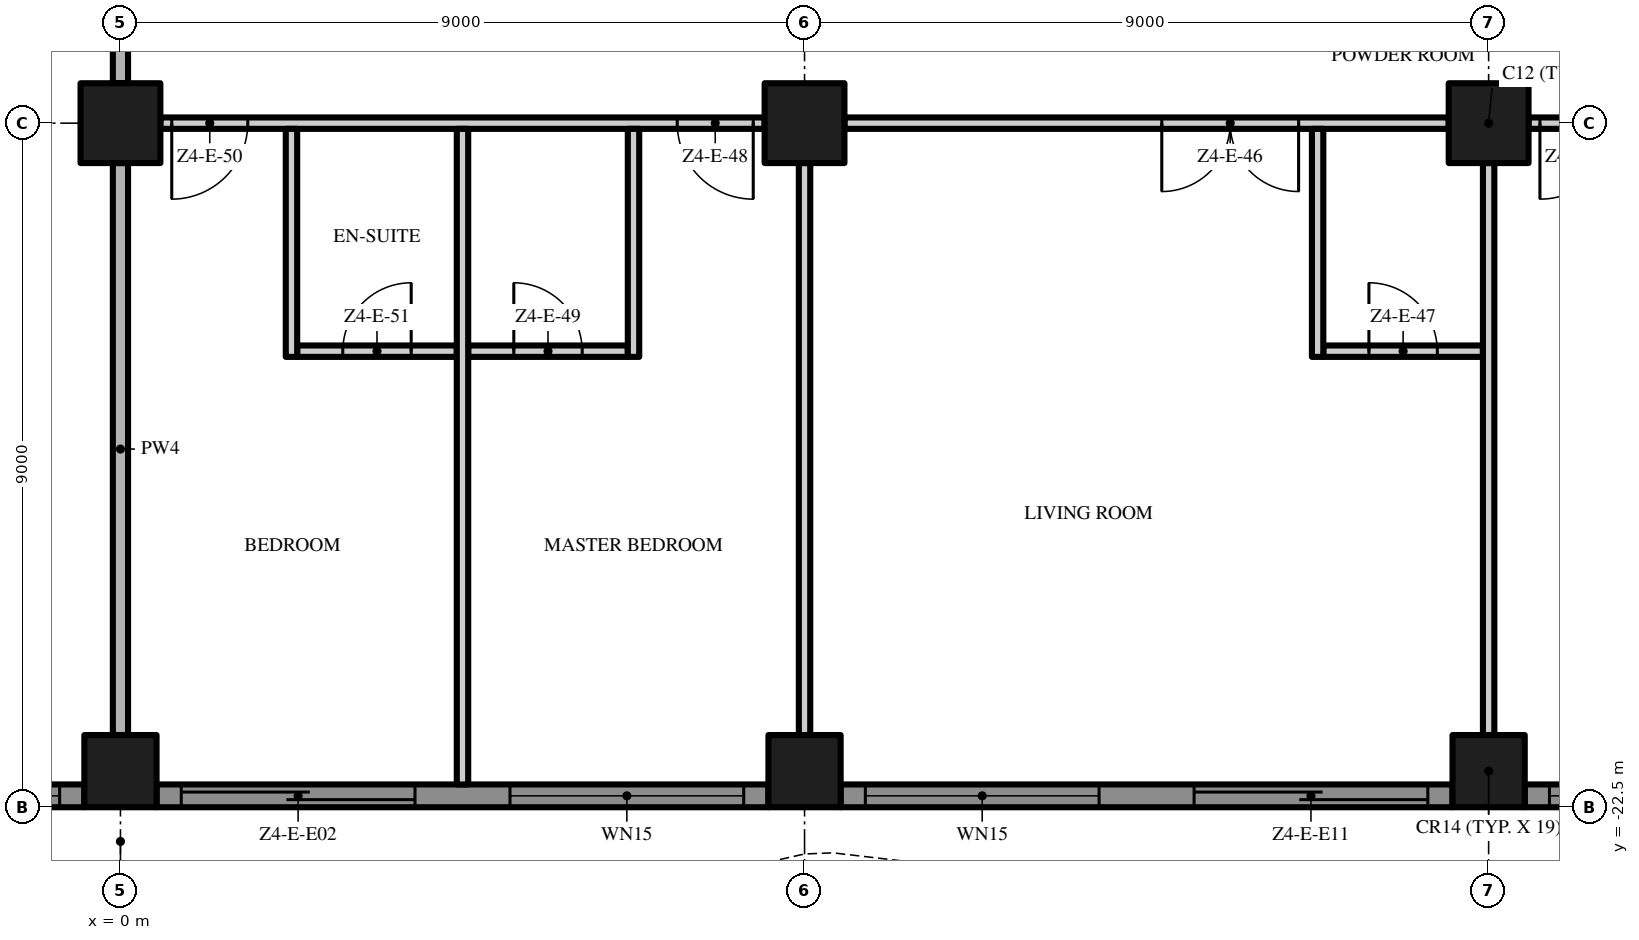
"""IFC4 building model, lengths in metres.
Left out: names, types, materials, properties, quantities, classifications, styles, units other than length and angle.
Written with IfcOpenShell. Run it as: python <this file> out.ifc"""

import sys

from ifc_helpers import new_model, si_unit, direction, frame, frame_2d, origin, origin_2d, place, context, subcontext, project, spatial, polyline, rectangle, outline, extrude, element, fill, save


model = new_model("IFC4")
c1 = context("Model", 3, precision=1e-05, world=origin(), true_north=direction((0.0, 1.0)))
c2 = subcontext(c1, "Body", "Model", "MODEL_VIEW")
j1 = project(units=[si_unit("LENGTHUNIT", "METRE"), si_unit("PLANEANGLEUNIT", "RADIAN")], contexts=[c1])
p1 = place(None, origin())
s1 = spatial("IfcSite", under=j1, at=p1, CompositionType="ELEMENT")
p2 = place(p1, origin())
s2 = spatial("IfcBuilding", under=s1, at=p2, CompositionType="ELEMENT")
p3 = place(p2, frame((0.0, 0.0, 230.0)))
s3 = spatial("IfcBuildingStorey", under=s2, at=p3, CompositionType="ELEMENT", Elevation=230.0)
p4 = place(p3, frame((0.0, -13.5, 0.0), z_axis=(0.0, 0.0, 1.0), x_axis=(1.0, 0.0, 0.0)))
e1 = element("IfcColumn", 1, at=p4, inside=s3, PredefinedType="COLUMN", context=c2, shape_type="SweptSolid", body=[
    extrude(rectangle(XDim=1.05, YDim=1.05, at=origin_2d()), origin(), (0.0, 0.0, 1.0), 3.5),
])
p5 = place(p3, frame((0.0, -22.025, 0.0), z_axis=(0.0, 0.0, 1.0), x_axis=(1.0, 0.0, 0.0)))
e2 = element("IfcColumn", 2, at=p5, inside=s3, PredefinedType="COLUMN", context=c2, shape_type="SweptSolid", body=[
    extrude(rectangle(XDim=0.95, YDim=0.95, at=origin_2d()), origin(), (0.0, 0.0, 1.0), 3.5),
])
p6 = place(p3, frame((18.0, -13.5, 0.0), z_axis=(0.0, 0.0, 1.0), x_axis=(1.0, 0.0, 0.0)))
e3 = element("IfcColumn", 3, at=p6, inside=s3, PredefinedType="COLUMN", context=c2, shape_type="SweptSolid", body=[
    extrude(rectangle(XDim=1.05, YDim=1.05, at=origin_2d()), origin(), (0.0, 0.0, 1.0), 3.5),
])
p7 = place(p3, frame((18.0, -22.025, 0.0), z_axis=(0.0, 0.0, 1.0), x_axis=(1.0, 0.0, 0.0)))
e4 = element("IfcColumn", 4, at=p7, inside=s3, PredefinedType="COLUMN", context=c2, shape_type="SweptSolid", body=[
    extrude(rectangle(XDim=0.95, YDim=0.95, at=origin_2d()), origin(), (0.0, 0.0, 1.0), 3.5),
])
p8 = place(p3, frame((9.0, -13.5, 0.0), z_axis=(0.0, 0.0, 1.0), x_axis=(1.0, 0.0, 0.0)))
e5 = element("IfcColumn", 5, at=p8, inside=s3, PredefinedType="COLUMN", context=c2, shape_type="SweptSolid", body=[
    extrude(rectangle(XDim=1.05, YDim=1.05, at=origin_2d()), origin(), (0.0, 0.0, 1.0), 3.5),
])
p9 = place(p3, frame((9.0, -22.025, 0.0), z_axis=(0.0, 0.0, 1.0), x_axis=(1.0, 0.0, 0.0)))
e6 = element("IfcColumn", 6, at=p9, inside=s3, PredefinedType="COLUMN", context=c2, shape_type="SweptSolid", body=[
    extrude(rectangle(XDim=0.95, YDim=0.95, at=origin_2d()), origin(), (0.0, 0.0, 1.0), 3.5),
])
p10 = place(p3, frame((-0.475, -22.35, 0.0), z_axis=(0.0, 0.0, 1.0), x_axis=(-1.0, 0.0, 0.0)))
e7 = element("IfcWall", 7, at=p10, inside=s3, PredefinedType="SOLIDWALL", context=c2, shape_type="SweptSolid", body=[
    extrude(rectangle(XDim=8.05, YDim=0.3, at=frame_2d((4.025, 0.0))), origin(), (0.0, 0.0, 1.0), 3.5),
])
p11 = place(p10, frame((4.65, 0.0, 0.45)))
e8 = element("IfcOpeningElement", 8, at=p11, cuts=e7, PredefinedType="OPENING", context=c2, shape_type="SweptSolid", body=[
    extrude(rectangle(XDim=3.075, YDim=2.65, at=frame_2d((1.538, 1.325))), frame((0.0, 0.16, 0.0), z_axis=(0.0, -1.0, 0.0), x_axis=(1.0, 0.0, 0.0)), (0.0, 0.0, 1.0), 0.32),
])
p12 = place(p10, frame((0.325, 0.0, 0.45)))
e9 = element("IfcOpeningElement", 9, at=p12, cuts=e7, PredefinedType="OPENING", context=c2, shape_type="SweptSolid", body=[
    extrude(rectangle(XDim=3.075, YDim=2.65, at=frame_2d((1.538, 1.325))), frame((0.0, 0.16, 0.0), z_axis=(0.0, -1.0, 0.0), x_axis=(1.0, 0.0, 0.0)), (0.0, 0.0, 1.0), 0.32),
])
p13 = place(p3, frame((8.525, -22.35, 0.0), z_axis=(0.0, 0.0, 1.0), x_axis=(-1.0, 0.0, 0.0)))
e10 = element("IfcWall", 10, at=p13, inside=s3, PredefinedType="SOLIDWALL", context=c2, shape_type="SweptSolid", body=[
    extrude(rectangle(XDim=8.05, YDim=0.3, at=frame_2d((4.025, 0.0))), origin(), (0.0, 0.0, 1.0), 3.5),
])
p14 = place(p13, frame((4.65, 0.0, 0.0)))
e11 = element("IfcOpeningElement", 11, at=p14, cuts=e10, PredefinedType="OPENING", context=c2, shape_type="SweptSolid", body=[
    extrude(rectangle(XDim=3.075, YDim=2.4, at=frame_2d((1.538, 1.2))), frame((0.0, 0.16, 0.0), z_axis=(0.0, -1.0, 0.0), x_axis=(1.0, 0.0, 0.0)), (0.0, 0.0, 1.0), 0.32),
])
p15 = place(p13, frame((0.325, 0.0, 0.45)))
e12 = element("IfcOpeningElement", 12, at=p15, cuts=e10, PredefinedType="OPENING", context=c2, shape_type="SweptSolid", body=[
    extrude(rectangle(XDim=3.075, YDim=2.65, at=frame_2d((1.538, 1.325))), frame((0.0, 0.16, 0.0), z_axis=(0.0, -1.0, 0.0), x_axis=(1.0, 0.0, 0.0)), (0.0, 0.0, 1.0), 0.32),
])
p16 = place(p3, frame((17.525, -22.35, 0.0), z_axis=(0.0, 0.0, 1.0), x_axis=(-1.0, 0.0, 0.0)))
e13 = element("IfcWall", 13, at=p16, inside=s3, PredefinedType="SOLIDWALL", context=c2, shape_type="SweptSolid", body=[
    extrude(rectangle(XDim=8.05, YDim=0.3, at=frame_2d((4.025, 0.0))), origin(), (0.0, 0.0, 1.0), 3.5),
])
p17 = place(p16, frame((4.65, 0.0, 0.45)))
e14 = element("IfcOpeningElement", 14, at=p17, cuts=e13, PredefinedType="OPENING", context=c2, shape_type="SweptSolid", body=[
    extrude(rectangle(XDim=3.075, YDim=2.65, at=frame_2d((1.538, 1.325))), frame((0.0, 0.16, 0.0), z_axis=(0.0, -1.0, 0.0), x_axis=(1.0, 0.0, 0.0)), (0.0, 0.0, 1.0), 0.32),
])
p18 = place(p16, frame((0.325, 0.0, 0.0)))
e15 = element("IfcOpeningElement", 15, at=p18, cuts=e13, PredefinedType="OPENING", context=c2, shape_type="SweptSolid", body=[
    extrude(rectangle(XDim=3.075, YDim=2.4, at=frame_2d((1.538, 1.2))), frame((0.0, 0.16, 0.0), z_axis=(0.0, -1.0, 0.0), x_axis=(1.0, 0.0, 0.0)), (0.0, 0.0, 1.0), 0.32),
])
p19 = place(p3, frame((22.5, -22.35, 0.0), z_axis=(0.0, 0.0, 1.0), x_axis=(-1.0, 0.0, 0.0)))
e16 = element("IfcWall", 16, at=p19, inside=s3, PredefinedType="SOLIDWALL", context=c2, shape_type="SweptSolid", body=[
    extrude(rectangle(XDim=4.025, YDim=0.3, at=frame_2d((2.013, 0.0))), origin(), (0.0, 0.0, 1.0), 3.5),
])
p20 = place(p19, frame((0.625, 0.0, 0.45)))
e17 = element("IfcOpeningElement", 17, at=p20, cuts=e16, PredefinedType="OPENING", context=c2, shape_type="SweptSolid", body=[
    extrude(rectangle(XDim=3.075, YDim=2.65, at=frame_2d((1.538, 1.325))), frame((0.0, 0.16, 0.0), z_axis=(0.0, -1.0, 0.0), x_axis=(1.0, 0.0, 0.0)), (0.0, 0.0, 1.0), 0.32),
])
p21 = place(p3, origin())
e18 = element("IfcWall", 18, at=p21, inside=s3, PredefinedType="USERDEFINED", context=c2, shape_type="SweptSolid", body=[
    extrude(outline(polyline([(-22.5, -23.451), (-21.0, -23.115), (-20.625, -23.1), (-19.5, -23.231), (-18.0, -23.755), (-16.5, -24.488), (-15.0, -25.149), (-13.5, -25.485), (-13.125, -25.5), (-12.0, -25.369), (-10.5, -24.845), (-9.0, -24.112), (-7.5, -23.451), (-6.0, -23.115), (-5.625, -23.1), (-4.5, -23.231), (-3.0, -23.755), (-1.5, -24.488), (0.0, -25.149), (1.5, -25.485), (1.875, -25.5), (3.0, -25.369), (4.5, -24.845), (6.0, -24.112), (7.5, -23.451), (9.0, -23.115), (9.375, -23.1), (10.5, -23.231), (12.0, -23.755), (13.5, -24.488), (15.0, -25.149), (16.5, -25.485), (16.875, -25.5), (18.0, -25.369), (19.5, -24.845), (21.0, -24.112), (22.5, -23.451), (22.399, -23.223), (20.895, -23.885), (19.404, -24.614), (17.944, -25.124), (16.865, -25.249), (16.533, -25.236), (15.079, -24.91), (13.605, -24.261), (12.096, -23.524), (10.556, -22.986), (9.385, -22.849), (8.967, -22.866), (7.421, -23.213), (5.895, -23.885), (4.404, -24.614), (2.944, -25.124), (1.865, -25.249), (1.533, -25.236), (0.079, -24.91), (-1.395, -24.261), (-2.904, -23.524), (-4.444, -22.986), (-5.615, -22.849), (-6.033, -22.866), (-7.579, -23.213), (-9.105, -23.885), (-10.596, -24.614), (-12.056, -25.124), (-13.135, -25.249), (-13.467, -25.236), (-14.921, -24.91), (-16.395, -24.261), (-17.904, -23.524), (-19.444, -22.986), (-20.615, -22.849), (-21.033, -22.866), (-22.555, -23.208), (-22.5, -23.451)])), origin(), (0.0, 0.0, 1.0), 0.9),
])
p22 = place(p3, frame((2.325, -16.5, 0.0), z_axis=(0.0, 0.0, 1.0), x_axis=(1.0, 0.0, 0.0)))
e19 = element("IfcWall", 19, at=p22, inside=s3, PredefinedType="PARTITIONING", context=c2, shape_type="SweptSolid", body=[
    extrude(rectangle(XDim=2.1, YDim=0.15, at=frame_2d((1.05, 0.0))), origin(), (0.0, 0.0, 1.0), 3.5),
])
p23 = place(p22, frame((0.6, 0.0, 0.0)))
e20 = element("IfcOpeningElement", 20, at=p23, cuts=e19, PredefinedType="OPENING", context=c2, shape_type="SweptSolid", body=[
    extrude(rectangle(XDim=0.9, YDim=2.1, at=frame_2d((0.45, 1.05))), frame((0.0, 0.085, 0.0), z_axis=(0.0, -1.0, 0.0), x_axis=(1.0, 0.0, 0.0)), (0.0, 0.0, 1.0), 0.17),
])
p24 = place(p3, frame((4.575, -16.5, 0.0), z_axis=(0.0, 0.0, 1.0), x_axis=(1.0, 0.0, 0.0)))
e21 = element("IfcWall", 21, at=p24, inside=s3, PredefinedType="PARTITIONING", context=c2, shape_type="SweptSolid", body=[
    extrude(rectangle(XDim=2.1, YDim=0.15, at=frame_2d((1.05, 0.0))), origin(), (0.0, 0.0, 1.0), 3.5),
])
p25 = place(p24, frame((0.6, 0.0, 0.0)))
e22 = element("IfcOpeningElement", 22, at=p25, cuts=e21, PredefinedType="OPENING", context=c2, shape_type="SweptSolid", body=[
    extrude(rectangle(XDim=0.9, YDim=2.1, at=frame_2d((0.45, 1.05))), frame((0.0, 0.085, 0.0), z_axis=(0.0, -1.0, 0.0), x_axis=(1.0, 0.0, 0.0)), (0.0, 0.0, 1.0), 0.17),
])
p26 = place(p3, frame((15.825, -16.5, 0.0), z_axis=(0.0, 0.0, 1.0), x_axis=(1.0, 0.0, 0.0)))
e23 = element("IfcWall", 23, at=p26, inside=s3, PredefinedType="PARTITIONING", context=c2, shape_type="SweptSolid", body=[
    extrude(rectangle(XDim=2.1, YDim=0.15, at=frame_2d((1.05, 0.0))), origin(), (0.0, 0.0, 1.0), 3.5),
])
p27 = place(p26, frame((0.6, 0.0, 0.0)))
e24 = element("IfcOpeningElement", 24, at=p27, cuts=e23, PredefinedType="OPENING", context=c2, shape_type="SweptSolid", body=[
    extrude(rectangle(XDim=0.9, YDim=2.1, at=frame_2d((0.45, 1.05))), frame((0.0, 0.085, 0.0), z_axis=(0.0, -1.0, 0.0), x_axis=(1.0, 0.0, 0.0)), (0.0, 0.0, 1.0), 0.17),
])
p28 = place(p3, frame((8.475, -13.5, 0.0), z_axis=(0.0, 0.0, 1.0), x_axis=(-1.0, 0.0, 0.0)))
e25 = element("IfcWall", 25, at=p28, inside=s3, PredefinedType="PARTITIONING", context=c2, shape_type="SweptSolid", body=[
    extrude(rectangle(XDim=7.95, YDim=0.15, at=frame_2d((3.975, 0.0))), origin(), (0.0, 0.0, 1.0), 3.5),
])
p29 = place(p28, frame((0.15, 0.0, 0.0)))
e26 = element("IfcOpeningElement", 26, at=p29, cuts=e25, PredefinedType="OPENING", context=c2, shape_type="SweptSolid", body=[
    extrude(rectangle(XDim=1.0, YDim=2.4, at=frame_2d((0.5, 1.2))), frame((0.0, 0.085, 0.0), z_axis=(0.0, -1.0, 0.0), x_axis=(1.0, 0.0, 0.0)), (0.0, 0.0, 1.0), 0.17),
])
p30 = place(p28, frame((6.8, 0.0, 0.0)))
e27 = element("IfcOpeningElement", 27, at=p30, cuts=e25, PredefinedType="OPENING", context=c2, shape_type="SweptSolid", body=[
    extrude(rectangle(XDim=1.0, YDim=2.4, at=frame_2d((0.5, 1.2))), frame((0.0, 0.085, 0.0), z_axis=(0.0, -1.0, 0.0), x_axis=(1.0, 0.0, 0.0)), (0.0, 0.0, 1.0), 0.17),
])
p31 = place(p3, frame((17.475, -13.5, 0.0), z_axis=(0.0, 0.0, 1.0), x_axis=(-1.0, 0.0, 0.0)))
e28 = element("IfcWall", 28, at=p31, inside=s3, PredefinedType="PARTITIONING", context=c2, shape_type="SweptSolid", body=[
    extrude(rectangle(XDim=7.95, YDim=0.15, at=frame_2d((3.975, 0.0))), origin(), (0.0, 0.0, 1.0), 3.5),
])
p32 = place(p31, frame((1.975, 0.0, 0.0)))
e29 = element("IfcOpeningElement", 29, at=p32, cuts=e28, PredefinedType="OPENING", context=c2, shape_type="SweptSolid", body=[
    extrude(rectangle(XDim=1.8, YDim=2.4, at=frame_2d((0.9, 1.2))), frame((0.0, 0.085, 0.0), z_axis=(0.0, -1.0, 0.0), x_axis=(1.0, 0.0, 0.0)), (0.0, 0.0, 1.0), 0.17),
])
p33 = place(p3, frame((26.05, -13.5, 0.0), z_axis=(0.0, 0.0, 1.0), x_axis=(-1.0, 0.0, 0.0)))
e30 = element("IfcWall", 30, at=p33, inside=s3, PredefinedType="PARTITIONING", context=c2, shape_type="SweptSolid", body=[
    extrude(rectangle(XDim=7.525, YDim=0.15, at=frame_2d((3.763, 0.0))), origin(), (0.0, 0.0, 1.0), 3.5),
])
p34 = place(p33, frame((0.8, 0.0, 0.0)))
e31 = element("IfcOpeningElement", 31, at=p34, cuts=e30, PredefinedType="OPENING", context=c2, shape_type="SweptSolid", body=[
    extrude(rectangle(XDim=1.0, YDim=2.4, at=frame_2d((0.5, 1.2))), frame((0.0, 0.085, 0.0), z_axis=(0.0, -1.0, 0.0), x_axis=(1.0, 0.0, 0.0)), (0.0, 0.0, 1.0), 0.17),
])
p35 = place(p33, frame((6.375, 0.0, 0.0)))
e32 = element("IfcOpeningElement", 32, at=p35, cuts=e30, PredefinedType="OPENING", context=c2, shape_type="SweptSolid", body=[
    extrude(rectangle(XDim=1.0, YDim=2.4, at=frame_2d((0.5, 1.2))), frame((0.0, 0.085, 0.0), z_axis=(0.0, -1.0, 0.0), x_axis=(1.0, 0.0, 0.0)), (0.0, 0.0, 1.0), 0.17),
])
p36 = place(p3, frame((0.0, -21.55, 0.0), z_axis=(0.0, 0.0, 1.0), x_axis=(0.0, 1.0, 0.0)))
e33 = element("IfcWall", 33, at=p36, inside=s3, PredefinedType="PARTITIONING", context=c2, shape_type="SweptSolid", body=[
    extrude(rectangle(XDim=7.525, YDim=0.2, at=frame_2d((3.763, 0.0))), origin(), (0.0, 0.0, 1.0), 3.5),
])
p37 = place(p3, frame((0.0, -12.975, 0.0), z_axis=(0.0, 0.0, 1.0), x_axis=(0.0, 1.0, 0.0)))
e34 = element("IfcWall", 34, at=p37, inside=s3, PredefinedType="PARTITIONING", context=c2, shape_type="SweptSolid", body=[
    extrude(rectangle(XDim=7.95, YDim=0.2, at=frame_2d((3.975, 0.0))), origin(), (0.0, 0.0, 1.0), 3.5),
])
p38 = place(p3, frame((2.25, -16.575, 0.0), z_axis=(0.0, 0.0, 1.0), x_axis=(0.0, 1.0, 0.0)))
e35 = element("IfcWall", 35, at=p38, inside=s3, PredefinedType="PARTITIONING", context=c2, shape_type="SweptSolid", body=[
    extrude(rectangle(XDim=3.0, YDim=0.15, at=frame_2d((1.5, 0.0))), origin(), (0.0, 0.0, 1.0), 3.5),
])
p39 = place(p3, frame((4.5, -22.2, 0.0), z_axis=(0.0, 0.0, 1.0), x_axis=(0.0, 1.0, 0.0)))
e36 = element("IfcWall", 36, at=p39, inside=s3, PredefinedType="PARTITIONING", context=c2, shape_type="SweptSolid", body=[
    extrude(rectangle(XDim=8.625, YDim=0.15, at=frame_2d((4.312, 0.0))), origin(), (0.0, 0.0, 1.0), 3.5),
])
p40 = place(p3, frame((6.75, -16.575, 0.0), z_axis=(0.0, 0.0, 1.0), x_axis=(0.0, 1.0, 0.0)))
e37 = element("IfcWall", 37, at=p40, inside=s3, PredefinedType="PARTITIONING", context=c2, shape_type="SweptSolid", body=[
    extrude(rectangle(XDim=3.0, YDim=0.15, at=frame_2d((1.5, 0.0))), origin(), (0.0, 0.0, 1.0), 3.5),
])
p41 = place(p3, frame((9.0, -21.55, 0.0), z_axis=(0.0, 0.0, 1.0), x_axis=(0.0, 1.0, 0.0)))
e38 = element("IfcWall", 38, at=p41, inside=s3, PredefinedType="PARTITIONING", context=c2, shape_type="SweptSolid", body=[
    extrude(rectangle(XDim=7.525, YDim=0.15, at=frame_2d((3.763, 0.0))), origin(), (0.0, 0.0, 1.0), 3.5),
])
p42 = place(p3, frame((15.75, -16.575, 0.0), z_axis=(0.0, 0.0, 1.0), x_axis=(0.0, 1.0, 0.0)))
e39 = element("IfcWall", 39, at=p42, inside=s3, PredefinedType="PARTITIONING", context=c2, shape_type="SweptSolid", body=[
    extrude(rectangle(XDim=3.0, YDim=0.15, at=frame_2d((1.5, 0.0))), origin(), (0.0, 0.0, 1.0), 3.5),
])
p43 = place(p3, frame((18.0, -21.55, 0.0), z_axis=(0.0, 0.0, 1.0), x_axis=(0.0, 1.0, 0.0)))
e40 = element("IfcWall", 40, at=p43, inside=s3, PredefinedType="PARTITIONING", context=c2, shape_type="SweptSolid", body=[
    extrude(rectangle(XDim=7.525, YDim=0.15, at=frame_2d((3.763, 0.0))), origin(), (0.0, 0.0, 1.0), 3.5),
])
p44 = place(p12, origin())
e41 = element("IfcWindow", 41, at=p44, inside=s3, PartitioningType="SINGLE_PANEL", PredefinedType="WINDOW", context=c2, shape_type="SweptSolid", body=[
    extrude(rectangle(XDim=3.075, YDim=2.65, at=frame_2d((1.538, 1.325))), frame((0.0, 0.03, 0.0), z_axis=(0.0, -1.0, 0.0), x_axis=(1.0, 0.0, 0.0)), (0.0, 0.0, 1.0), 0.06),
])
fill(e9, e41)
p45 = place(p14, origin())
e42 = element("IfcDoor", 42, at=p45, inside=s3, OperationType="SINGLE_SWING_LEFT", PredefinedType="DOOR", context=c2, shape_type="SweptSolid", body=[
    extrude(rectangle(XDim=3.075, YDim=2.4, at=frame_2d((1.538, 1.2))), frame((0.0, 0.025, 0.0), z_axis=(0.0, -1.0, 0.0), x_axis=(1.0, 0.0, 0.0)), (0.0, 0.0, 1.0), 0.05),
])
fill(e11, e42)
p46 = place(p15, origin())
e43 = element("IfcWindow", 43, at=p46, inside=s3, PartitioningType="SINGLE_PANEL", PredefinedType="WINDOW", context=c2, shape_type="SweptSolid", body=[
    extrude(rectangle(XDim=3.075, YDim=2.65, at=frame_2d((1.538, 1.325))), frame((0.0, 0.03, 0.0), z_axis=(0.0, -1.0, 0.0), x_axis=(1.0, 0.0, 0.0)), (0.0, 0.0, 1.0), 0.06),
])
fill(e12, e43)
p47 = place(p17, origin())
e44 = element("IfcWindow", 44, at=p47, inside=s3, PartitioningType="SINGLE_PANEL", PredefinedType="WINDOW", context=c2, shape_type="SweptSolid", body=[
    extrude(rectangle(XDim=3.075, YDim=2.65, at=frame_2d((1.538, 1.325))), frame((0.0, 0.03, 0.0), z_axis=(0.0, -1.0, 0.0), x_axis=(1.0, 0.0, 0.0)), (0.0, 0.0, 1.0), 0.06),
])
fill(e14, e44)
p48 = place(p18, origin())
e45 = element("IfcDoor", 45, at=p48, inside=s3, OperationType="SINGLE_SWING_LEFT", PredefinedType="DOOR", context=c2, shape_type="SweptSolid", body=[
    extrude(rectangle(XDim=3.075, YDim=2.4, at=frame_2d((1.538, 1.2))), frame((0.0, 0.025, 0.0), z_axis=(0.0, -1.0, 0.0), x_axis=(1.0, 0.0, 0.0)), (0.0, 0.0, 1.0), 0.05),
])
fill(e15, e45)
p49 = place(p20, origin())
e46 = element("IfcWindow", 46, at=p49, inside=s3, PartitioningType="SINGLE_PANEL", PredefinedType="WINDOW", context=c2, shape_type="SweptSolid", body=[
    extrude(rectangle(XDim=3.075, YDim=2.65, at=frame_2d((1.538, 1.325))), frame((0.0, 0.03, 0.0), z_axis=(0.0, -1.0, 0.0), x_axis=(1.0, 0.0, 0.0)), (0.0, 0.0, 1.0), 0.06),
])
fill(e17, e46)
p50 = place(p35, origin())
e47 = element("IfcDoor", 47, at=p50, inside=s3, OperationType="SINGLE_SWING_RIGHT", PredefinedType="DOOR", context=c2, shape_type="SweptSolid", body=[
    extrude(rectangle(XDim=1.0, YDim=2.4, at=frame_2d((0.5, 1.2))), frame((0.0, 0.025, 0.0), z_axis=(0.0, -1.0, 0.0), x_axis=(1.0, 0.0, 0.0)), (0.0, 0.0, 1.0), 0.05),
])
fill(e32, e47)
p51 = place(p32, origin())
e48 = element("IfcDoor", 48, at=p51, inside=s3, OperationType="DOUBLE_DOOR_SINGLE_SWING", PredefinedType="DOOR", context=c2, shape_type="SweptSolid", body=[
    extrude(rectangle(XDim=1.8, YDim=2.4, at=frame_2d((0.9, 1.2))), frame((0.0, 0.025, 0.0), z_axis=(0.0, -1.0, 0.0), x_axis=(1.0, 0.0, 0.0)), (0.0, 0.0, 1.0), 0.05),
])
fill(e29, e48)
p52 = place(p27, origin())
e49 = element("IfcDoor", 49, at=p52, inside=s3, OperationType="SINGLE_SWING_LEFT", PredefinedType="DOOR", context=c2, shape_type="SweptSolid", body=[
    extrude(rectangle(XDim=0.9, YDim=2.1, at=frame_2d((0.45, 1.05))), frame((0.0, 0.025, 0.0), z_axis=(0.0, -1.0, 0.0), x_axis=(1.0, 0.0, 0.0)), (0.0, 0.0, 1.0), 0.05),
])
fill(e24, e49)
p53 = place(p29, origin())
e50 = element("IfcDoor", 50, at=p53, inside=s3, OperationType="SINGLE_SWING_LEFT", PredefinedType="DOOR", context=c2, shape_type="SweptSolid", body=[
    extrude(rectangle(XDim=1.0, YDim=2.4, at=frame_2d((0.5, 1.2))), frame((0.0, 0.025, 0.0), z_axis=(0.0, -1.0, 0.0), x_axis=(1.0, 0.0, 0.0)), (0.0, 0.0, 1.0), 0.05),
])
fill(e26, e50)
p54 = place(p25, origin())
e51 = element("IfcDoor", 51, at=p54, inside=s3, OperationType="SINGLE_SWING_LEFT", PredefinedType="DOOR", context=c2, shape_type="SweptSolid", body=[
    extrude(rectangle(XDim=0.9, YDim=2.1, at=frame_2d((0.45, 1.05))), frame((0.0, 0.025, 0.0), z_axis=(0.0, -1.0, 0.0), x_axis=(1.0, 0.0, 0.0)), (0.0, 0.0, 1.0), 0.05),
])
fill(e22, e51)
p55 = place(p30, origin())
e52 = element("IfcDoor", 52, at=p55, inside=s3, OperationType="SINGLE_SWING_RIGHT", PredefinedType="DOOR", context=c2, shape_type="SweptSolid", body=[
    extrude(rectangle(XDim=1.0, YDim=2.4, at=frame_2d((0.5, 1.2))), frame((0.0, 0.025, 0.0), z_axis=(0.0, -1.0, 0.0), x_axis=(1.0, 0.0, 0.0)), (0.0, 0.0, 1.0), 0.05),
])
fill(e27, e52)
p56 = place(p23, origin())
e53 = element("IfcDoor", 53, at=p56, inside=s3, OperationType="SINGLE_SWING_RIGHT", PredefinedType="DOOR", context=c2, shape_type="SweptSolid", body=[
    extrude(rectangle(XDim=0.9, YDim=2.1, at=frame_2d((0.45, 1.05))), frame((0.0, 0.025, 0.0), z_axis=(0.0, -1.0, 0.0), x_axis=(1.0, 0.0, 0.0)), (0.0, 0.0, 1.0), 0.05),
])
fill(e20, e53)
save(model, sys.argv[1])
